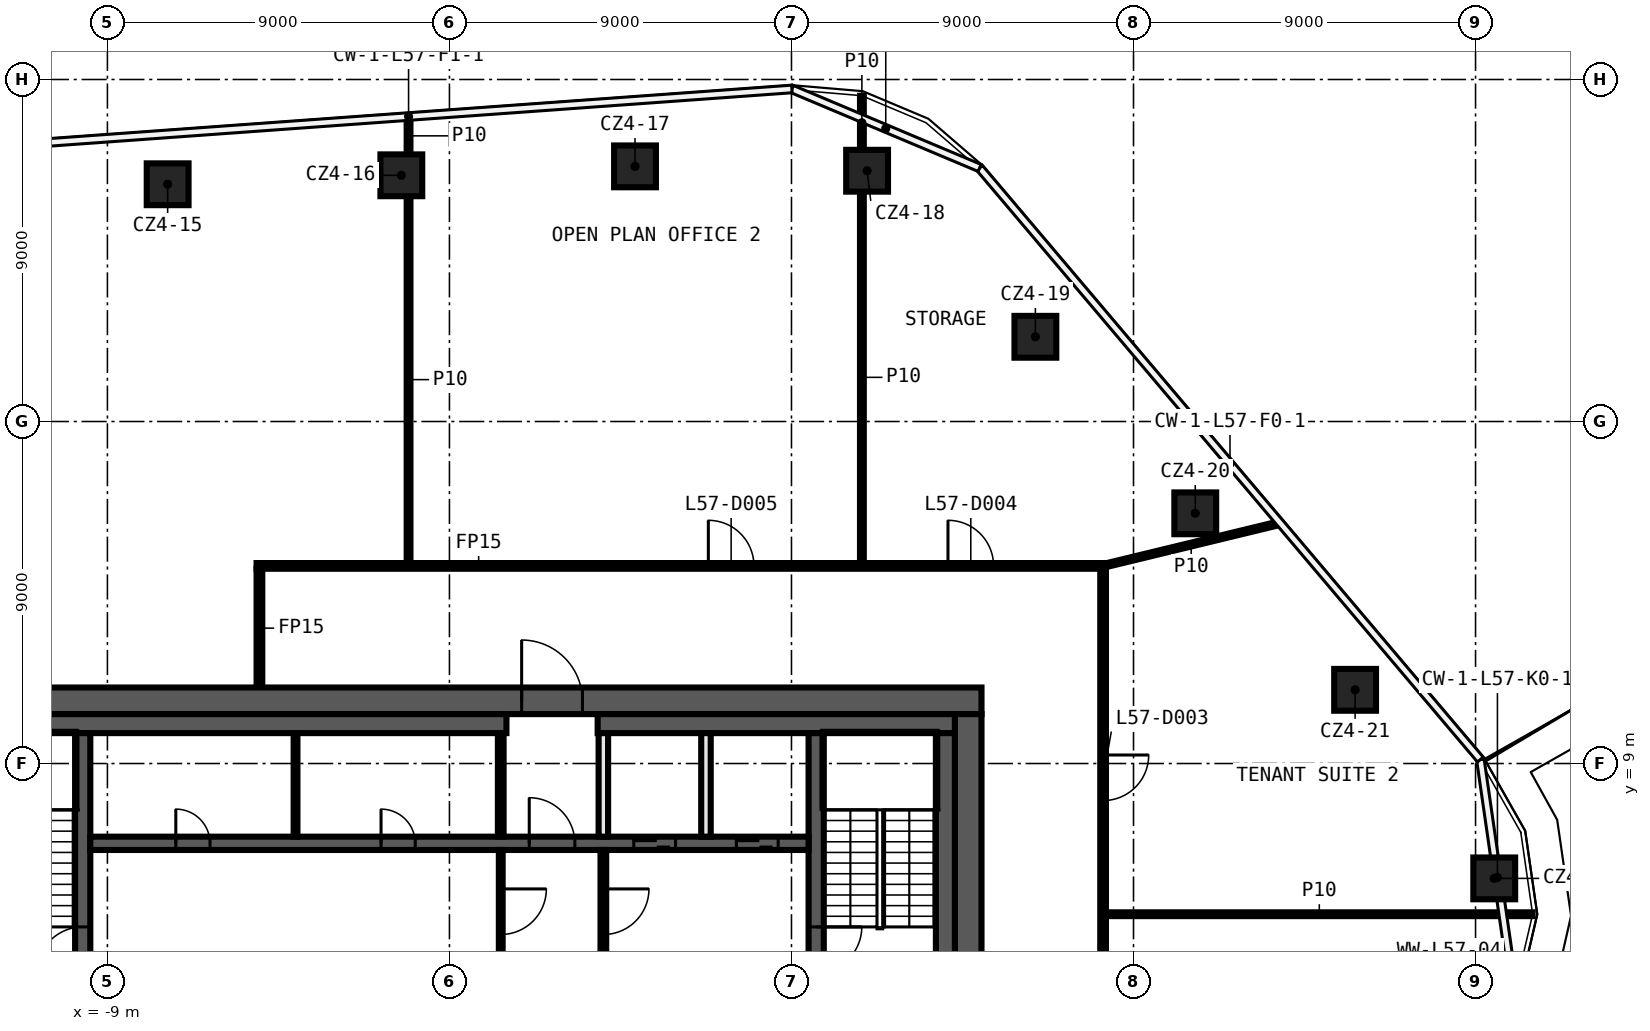
"""IFC4 building model, lengths in metres.
Left out: names, types, materials, properties, quantities, classifications, styles, units other than length and angle.
Written with IfcOpenShell. Run it as: python <this file> out.ifc"""

import sys

from ifc_helpers import new_model, si_unit, direction, frame, frame_2d, origin, origin_2d, place, context, subcontext, project, spatial, rectangle, extrude, element, fill, save


model = new_model("IFC4")
c1 = context("Model", 3, precision=1e-05, world=origin(), true_north=direction((0.0, 1.0)))
c2 = subcontext(c1, "Body", "Model", "MODEL_VIEW")
j1 = project(units=[si_unit("LENGTHUNIT", "METRE"), si_unit("PLANEANGLEUNIT", "RADIAN")], contexts=[c1])
p1 = place(None, origin())
s1 = spatial("IfcSite", under=j1, at=p1, CompositionType="ELEMENT")
p2 = place(p1, origin())
s2 = spatial("IfcBuilding", under=s1, at=p2, CompositionType="ELEMENT")
p3 = place(p2, frame((0.0, 0.0, 270.6)))
s3 = spatial("IfcBuildingStorey", under=s2, at=p3, CompositionType="ELEMENT", Elevation=270.6)
for number, where, z_axis, x_axis in (
    (1, (-7.415, 24.243, 0.0), (0.0, 0.0, 1.0), (1.0, 0.0, 0.0)),
    (2, (-1.266, 24.479, 0.0), (0.0, 0.0, 1.0), (1.0, 0.0, 0.0)),
    (3, (4.883, 24.714, 0.0), (0.0, 0.0, 1.0), (1.0, 0.0, 0.0)),
    (4, (10.99, 24.599, 0.0), (0.0, 0.0, 1.0), (1.0, 0.0, 0.0)),
    (5, (15.418, 20.229, 0.0), (0.0, 0.0, 1.0), (1.0, 0.0, 0.0)),
    (6, (19.625, 15.584, 0.0), (0.0, 0.0, 1.0), (1.0, 0.0, 0.0)),
    (7, (23.831, 10.939, 0.0), (0.0, 0.0, 1.0), (1.0, 0.0, 0.0)),
    (8, (27.492, 5.977, 0.0), (0.0, 0.0, 1.0), (1.0, 0.0, 0.0)),
):
    element("IfcColumn", number, at=place(p3, frame(where, z_axis=z_axis, x_axis=x_axis)), inside=s3, PredefinedType="COLUMN", context=c2, shape_type="SweptSolid", body=[
        extrude(rectangle(XDim=1.1, YDim=1.1, at=origin_2d()), origin(), (0.0, 0.0, 1.0), 3.82),
    ])
p4 = place(p3, frame((17.275, 5.034, 0.0), z_axis=(0.0, 0.0, 1.0), x_axis=(1.0, 0.0, 0.0)))
e9 = element("IfcWall", 9, at=p4, inside=s3, PredefinedType="PARTITIONING", context=c2, shape_type="SweptSolid", body=[
    extrude(rectangle(XDim=11.227, YDim=0.1, at=frame_2d((5.614, 0.0))), origin(), (0.0, 0.0, 1.0), 3.82),
])
p5 = place(p3, frame((-5.075, 14.2, 0.0), z_axis=(0.0, 0.0, 1.0), x_axis=(1.0, 0.0, 0.0)))
e10 = element("IfcWall", 10, at=p5, inside=s3, PredefinedType="PARTITIONING", context=c2, shape_type="SweptSolid", body=[
    extrude(rectangle(XDim=22.35, YDim=0.15, at=frame_2d((11.175, 0.0))), origin(), (0.0, 0.0, 1.0), 3.82),
])
p6 = place(p5, frame((18.193, 0.0, 0.0)))
e11 = element("IfcOpeningElement", 11, at=p6, cuts=e10, PredefinedType="OPENING", context=c2, shape_type="SweptSolid", body=[
    extrude(rectangle(XDim=1.2, YDim=2.1, at=frame_2d((0.6, 1.05))), frame((0.0, 0.085, 0.0), z_axis=(0.0, -1.0, 0.0), x_axis=(1.0, 0.0, 0.0)), (0.0, 0.0, 1.0), 0.17),
])
p7 = place(p5, frame((11.887, 0.0, 0.0)))
e12 = element("IfcOpeningElement", 12, at=p7, cuts=e10, PredefinedType="OPENING", context=c2, shape_type="SweptSolid", body=[
    extrude(rectangle(XDim=1.2, YDim=2.1, at=frame_2d((0.6, 1.05))), frame((0.0, 0.085, 0.0), z_axis=(0.0, -1.0, 0.0), x_axis=(1.0, 0.0, 0.0)), (0.0, 0.0, 1.0), 0.17),
])
p8 = place(p3, frame((17.2, 14.2, 0.0), z_axis=(0.0, 0.0, 1.0), x_axis=(0.971845844502, 0.235617602322, 0.0)))
e13 = element("IfcWall", 13, at=p8, inside=s3, PredefinedType="PARTITIONING", context=c2, shape_type="SweptSolid", body=[
    extrude(rectangle(XDim=4.771, YDim=0.1, at=frame_2d((2.385, 0.0))), origin(), (0.0, 0.0, 1.0), 3.82),
])
p9 = place(p3, frame((17.2, 14.125, 0.0), z_axis=(0.0, 0.0, 1.0), x_axis=(0.0, -1.0, 0.0)))
e14 = element("IfcWall", 14, at=p9, inside=s3, PredefinedType="PARTITIONING", context=c2, shape_type="SweptSolid", body=[
    extrude(rectangle(XDim=28.25, YDim=0.15, at=frame_2d((14.125, 0.0))), origin(), (0.0, 0.0, 1.0), 3.82),
])
p10 = place(p9, frame((23.379, 0.0, 0.0)))
e15 = element("IfcOpeningElement", 15, at=p10, cuts=e14, PredefinedType="OPENING", context=c2, shape_type="SweptSolid", body=[
    extrude(rectangle(XDim=1.2, YDim=2.1, at=frame_2d((0.6, 1.05))), frame((0.0, 0.085, 0.0), z_axis=(0.0, -1.0, 0.0), x_axis=(1.0, 0.0, 0.0)), (0.0, 0.0, 1.0), 0.17),
])
p11 = place(p9, frame((4.901, 0.0, 0.0)))
e16 = element("IfcOpeningElement", 16, at=p11, cuts=e14, PredefinedType="OPENING", context=c2, shape_type="SweptSolid", body=[
    extrude(rectangle(XDim=1.2, YDim=2.1, at=frame_2d((0.6, 1.05))), frame((0.0, 0.085, 0.0), z_axis=(0.0, -1.0, 0.0), x_axis=(1.0, 0.0, 0.0)), (0.0, 0.0, 1.0), 0.17),
])
p12 = place(p3, frame((10.853, 14.275, 0.0), z_axis=(0.0, 0.0, 1.0), x_axis=(0.0, 1.0, 0.0)))
e17 = element("IfcWall", 17, at=p12, inside=s3, PredefinedType="PARTITIONING", context=c2, shape_type="SweptSolid", body=[
    extrude(rectangle(XDim=9.774, YDim=0.1, at=frame_2d((4.887, 0.0))), origin(), (0.0, 0.0, 1.0), 3.82),
])
p13 = place(p3, frame((10.853, 25.149, 0.0), z_axis=(0.0, 0.0, 1.0), x_axis=(0.0, 1.0, 0.0)))
e18 = element("IfcWall", 18, at=p13, inside=s3, PredefinedType="PARTITIONING", context=c2, shape_type="SweptSolid", body=[
    extrude(rectangle(XDim=1.423, YDim=0.1, at=frame_2d((0.712, 0.0))), origin(), (0.0, 0.0, 1.0), 3.82),
])
p14 = place(p3, frame((-1.076, 14.275, 0.0), z_axis=(0.0, 0.0, 1.0), x_axis=(0.0, 1.0, 0.0)))
e19 = element("IfcWall", 19, at=p14, inside=s3, PredefinedType="PARTITIONING", context=c2, shape_type="SweptSolid", body=[
    extrude(rectangle(XDim=9.654, YDim=0.1, at=frame_2d((4.827, 0.0))), origin(), (0.0, 0.0, 1.0), 3.82),
])
p15 = place(p3, frame((-1.076, 25.029, 0.0), z_axis=(0.0, 0.0, 1.0), x_axis=(0.0, 1.0, 0.0)))
e20 = element("IfcWall", 20, at=p15, inside=s3, PredefinedType="PARTITIONING", context=c2, shape_type="SweptSolid", body=[
    extrude(rectangle(XDim=0.976, YDim=0.1, at=frame_2d((0.488, 0.0))), origin(), (0.0, 0.0, 1.0), 3.82),
])
p16 = place(p3, frame((-5.0, 11.0, 0.0), z_axis=(0.0, 0.0, 1.0), x_axis=(0.0, 1.0, 0.0)))
e21 = element("IfcWall", 21, at=p16, inside=s3, PredefinedType="PARTITIONING", context=c2, shape_type="SweptSolid", body=[
    extrude(rectangle(XDim=3.125, YDim=0.15, at=frame_2d((1.562, 0.0))), origin(), (0.0, 0.0, 1.0), 3.82),
])
p17 = place(p3, frame((-14.0, 10.65, 0.0), z_axis=(0.0, 0.0, 1.0), x_axis=(1.0, 0.0, 0.0)))
e22 = element("IfcWall", 22, at=p17, inside=s3, PredefinedType="SHEAR", context=c2, shape_type="SweptSolid", body=[
    extrude(rectangle(XDim=28.0, YDim=0.7, at=frame_2d((14.0, 0.0))), origin(), (0.0, 0.0, 1.0), 3.82),
])
p18 = place(p17, frame((15.9, 0.0, 0.0)))
e23 = element("IfcOpeningElement", 23, at=p18, cuts=e22, PredefinedType="OPENING", context=c2, shape_type="SweptSolid", body=[
    extrude(rectangle(XDim=1.6, YDim=2.1, at=frame_2d((0.8, 1.05))), frame((0.0, 0.36, 0.0), z_axis=(0.0, -1.0, 0.0), x_axis=(1.0, 0.0, 0.0)), (0.0, 0.0, 1.0), 0.72),
])
p19 = place(p3, frame((13.65, 10.3, 0.0), z_axis=(0.0, 0.0, 1.0), x_axis=(0.0, -1.0, 0.0)))
e24 = element("IfcWall", 24, at=p19, inside=s3, PredefinedType="SHEAR", context=c2, shape_type="SweptSolid", body=[
    extrude(rectangle(XDim=20.6, YDim=0.7, at=frame_2d((10.3, 0.0))), origin(), (0.0, 0.0, 1.0), 3.82),
])
p20 = place(p3, frame((-13.3, 10.05, 0.0), z_axis=(0.0, 0.0, 1.0), x_axis=(1.0, 0.0, 0.0)))
e25 = element("IfcWall", 25, at=p20, inside=s3, PredefinedType="SHEAR", context=c2, shape_type="SweptSolid", body=[
    extrude(rectangle(XDim=14.8, YDim=0.5, at=frame_2d((7.4, 0.0))), origin(), (0.0, 0.0, 1.0), 3.82),
])
p21 = place(p3, frame((3.9, 10.05, 0.0), z_axis=(0.0, 0.0, 1.0), x_axis=(1.0, 0.0, 0.0)))
e26 = element("IfcWall", 26, at=p21, inside=s3, PredefinedType="SHEAR", context=c2, shape_type="SweptSolid", body=[
    extrude(rectangle(XDim=9.4, YDim=0.5, at=frame_2d((4.7, 0.0))), origin(), (0.0, 0.0, 1.0), 3.82),
])
p22 = place(p3, frame((13.05, 9.8, 0.0), z_axis=(0.0, 0.0, 1.0), x_axis=(0.0, -1.0, 0.0)))
e27 = element("IfcWall", 27, at=p22, inside=s3, PredefinedType="SHEAR", context=c2, shape_type="SweptSolid", body=[
    extrude(rectangle(XDim=19.6, YDim=0.5, at=frame_2d((9.8, 0.0))), origin(), (0.0, 0.0, 1.0), 3.82),
])
p23 = place(p3, frame((9.65, 9.8, 0.0), z_axis=(0.0, 0.0, 1.0), x_axis=(0.0, -1.0, 0.0)))
e28 = element("IfcWall", 28, at=p23, inside=s3, PredefinedType="SHEAR", context=c2, shape_type="SweptSolid", body=[
    extrude(rectangle(XDim=7.5, YDim=0.4, at=frame_2d((3.75, 0.0))), origin(), (0.0, 0.0, 1.0), 3.82),
])
p24 = place(p23, frame((5.1, 0.0, 0.0)))
e29 = element("IfcOpeningElement", 29, at=p24, cuts=e28, PredefinedType="OPENING", context=c2, shape_type="SweptSolid", body=[
    extrude(rectangle(XDim=1.2, YDim=2.1, at=frame_2d((0.6, 1.05))), frame((0.0, 0.21, 0.0), z_axis=(0.0, -1.0, 0.0), x_axis=(1.0, 0.0, 0.0)), (0.0, 0.0, 1.0), 0.42),
])
p25 = place(p3, frame((-9.65, 2.3, 0.0), z_axis=(0.0, 0.0, 1.0), x_axis=(0.0, 1.0, 0.0)))
e30 = element("IfcWall", 30, at=p25, inside=s3, PredefinedType="SHEAR", context=c2, shape_type="SweptSolid", body=[
    extrude(rectangle(XDim=7.5, YDim=0.4, at=frame_2d((3.75, 0.0))), origin(), (0.0, 0.0, 1.0), 3.82),
])
p26 = place(p25, frame((1.2, 0.0, 0.0)))
e31 = element("IfcOpeningElement", 31, at=p26, cuts=e30, PredefinedType="OPENING", context=c2, shape_type="SweptSolid", body=[
    extrude(rectangle(XDim=1.2, YDim=2.1, at=frame_2d((0.6, 1.05))), frame((0.0, 0.21, 0.0), z_axis=(0.0, -1.0, 0.0), x_axis=(1.0, 0.0, 0.0)), (0.0, 0.0, 1.0), 0.42),
])
p27 = place(p3, frame((-9.45, 6.9, 0.0), z_axis=(0.0, 0.0, 1.0), x_axis=(1.0, 0.0, 0.0)))
e32 = element("IfcWall", 32, at=p27, inside=s3, PredefinedType="SHEAR", context=c2, shape_type="SweptSolid", body=[
    extrude(rectangle(XDim=18.9, YDim=0.35, at=frame_2d((9.45, 0.0))), origin(), (0.0, 0.0, 1.0), 3.82),
])
p28 = place(p27, frame((11.55, 0.0, 0.0)))
e33 = element("IfcOpeningElement", 33, at=p28, cuts=e32, PredefinedType="OPENING", context=c2, shape_type="SweptSolid", body=[
    extrude(rectangle(XDim=1.2, YDim=2.1, at=frame_2d((0.6, 1.05))), frame((0.0, 0.185, 0.0), z_axis=(0.0, -1.0, 0.0), x_axis=(1.0, 0.0, 0.0)), (0.0, 0.0, 1.0), 0.37),
])
p29 = place(p27, frame((14.3, 0.0, 0.0)))
e34 = element("IfcOpeningElement", 34, at=p29, cuts=e32, PredefinedType="OPENING", context=c2, shape_type="SweptSolid", body=[
    extrude(rectangle(XDim=1.1, YDim=2.1, at=frame_2d((0.55, 1.05))), frame((0.0, 0.185, 0.0), z_axis=(0.0, -1.0, 0.0), x_axis=(1.0, 0.0, 0.0)), (0.0, 0.0, 1.0), 0.37),
])
p30 = place(p27, frame((17.0, 0.0, 0.0)))
e35 = element("IfcOpeningElement", 35, at=p30, cuts=e32, PredefinedType="OPENING", context=c2, shape_type="SweptSolid", body=[
    extrude(rectangle(XDim=1.1, YDim=2.1, at=frame_2d((0.55, 1.05))), frame((0.0, 0.185, 0.0), z_axis=(0.0, -1.0, 0.0), x_axis=(1.0, 0.0, 0.0)), (0.0, 0.0, 1.0), 0.37),
])
p31 = place(p27, frame((2.25, 0.0, 0.0)))
e36 = element("IfcOpeningElement", 36, at=p31, cuts=e32, PredefinedType="OPENING", context=c2, shape_type="SweptSolid", body=[
    extrude(rectangle(XDim=0.9, YDim=2.1, at=frame_2d((0.45, 1.05))), frame((0.0, 0.185, 0.0), z_axis=(0.0, -1.0, 0.0), x_axis=(1.0, 0.0, 0.0)), (0.0, 0.0, 1.0), 0.37),
])
p32 = place(p27, frame((7.65, 0.0, 0.0)))
e37 = element("IfcOpeningElement", 37, at=p32, cuts=e32, PredefinedType="OPENING", context=c2, shape_type="SweptSolid", body=[
    extrude(rectangle(XDim=0.9, YDim=2.1, at=frame_2d((0.45, 1.05))), frame((0.0, 0.185, 0.0), z_axis=(0.0, -1.0, 0.0), x_axis=(1.0, 0.0, 0.0)), (0.0, 0.0, 1.0), 0.37),
])
p33 = place(p3, frame((6.75, 7.075, 0.0), z_axis=(0.0, 0.0, 1.0), x_axis=(0.0, 1.0, 0.0)))
e38 = element("IfcWall", 38, at=p33, inside=s3, PredefinedType="SOLIDWALL", context=c2, shape_type="SweptSolid", body=[
    extrude(rectangle(XDim=2.725, YDim=0.25, at=frame_2d((1.363, 0.0))), origin(), (0.0, 0.0, 1.0), 3.82),
])
p34 = place(p3, frame((4.05, 6.725, 0.0), z_axis=(0.0, 0.0, 1.0), x_axis=(0.0, -1.0, 0.0)))
e39 = element("IfcWall", 39, at=p34, inside=s3, PredefinedType="PARTITIONING", context=c2, shape_type="SweptSolid", body=[
    extrude(rectangle(XDim=3.25, YDim=0.15, at=frame_2d((1.625, 0.0))), origin(), (0.0, 0.0, 1.0), 3.82),
])
p35 = place(p34, frame((1.025, 0.0, 0.0)))
e40 = element("IfcOpeningElement", 40, at=p35, cuts=e39, PredefinedType="OPENING", context=c2, shape_type="SweptSolid", body=[
    extrude(rectangle(XDim=1.2, YDim=2.1, at=frame_2d((0.6, 1.05))), frame((0.0, 0.085, 0.0), z_axis=(0.0, -1.0, 0.0), x_axis=(1.0, 0.0, 0.0)), (0.0, 0.0, 1.0), 0.17),
])
p36 = place(p3, frame((4.05, 7.075, 0.0), z_axis=(0.0, 0.0, 1.0), x_axis=(0.0, 1.0, 0.0)))
e41 = element("IfcWall", 41, at=p36, inside=s3, PredefinedType="SOLIDWALL", context=c2, shape_type="SweptSolid", body=[
    extrude(rectangle(XDim=2.725, YDim=0.25, at=frame_2d((1.363, 0.0))), origin(), (0.0, 0.0, 1.0), 3.82),
])
p37 = place(p3, frame((1.35, 7.075, 0.0), z_axis=(0.0, 0.0, 1.0), x_axis=(0.0, 1.0, 0.0)))
e42 = element("IfcWall", 42, at=p37, inside=s3, PredefinedType="PARTITIONING", context=c2, shape_type="SweptSolid", body=[
    extrude(rectangle(XDim=2.725, YDim=0.15, at=frame_2d((1.363, 0.0))), origin(), (0.0, 0.0, 1.0), 3.82),
])
p38 = place(p3, frame((1.35, 6.725, 0.0), z_axis=(0.0, 0.0, 1.0), x_axis=(0.0, -1.0, 0.0)))
e43 = element("IfcWall", 43, at=p38, inside=s3, PredefinedType="PARTITIONING", context=c2, shape_type="SweptSolid", body=[
    extrude(rectangle(XDim=3.25, YDim=0.1, at=frame_2d((1.625, 0.0))), origin(), (0.0, 0.0, 1.0), 3.82),
])
p39 = place(p38, frame((1.025, 0.0, 0.0)))
e44 = element("IfcOpeningElement", 44, at=p39, cuts=e43, PredefinedType="OPENING", context=c2, shape_type="SweptSolid", body=[
    extrude(rectangle(XDim=1.2, YDim=2.1, at=frame_2d((0.6, 1.05))), frame((0.0, 0.06, 0.0), z_axis=(0.0, -1.0, 0.0), x_axis=(1.0, 0.0, 0.0)), (0.0, 0.0, 1.0), 0.12),
])
p40 = place(p3, frame((-4.05, 7.075, 0.0), z_axis=(0.0, 0.0, 1.0), x_axis=(0.0, 1.0, 0.0)))
e45 = element("IfcWall", 45, at=p40, inside=s3, PredefinedType="PARTITIONING", context=c2, shape_type="SweptSolid", body=[
    extrude(rectangle(XDim=2.725, YDim=0.1, at=frame_2d((1.363, 0.0))), origin(), (0.0, 0.0, 1.0), 3.82),
])
p41 = place(p11, origin())
e46 = element("IfcDoor", 46, at=p41, inside=s3, OperationType="SINGLE_SWING_RIGHT", PredefinedType="DOOR", context=c2, shape_type="SweptSolid", body=[
    extrude(rectangle(XDim=1.2, YDim=2.1, at=frame_2d((0.6, 1.05))), frame((0.0, 0.025, 0.0), z_axis=(0.0, -1.0, 0.0), x_axis=(1.0, 0.0, 0.0)), (0.0, 0.0, 1.0), 0.05),
])
fill(e16, e46)
p42 = place(p6, origin())
e47 = element("IfcDoor", 47, at=p42, inside=s3, OperationType="SINGLE_SWING_LEFT", PredefinedType="DOOR", context=c2, shape_type="SweptSolid", body=[
    extrude(rectangle(XDim=1.2, YDim=2.1, at=frame_2d((0.6, 1.05))), frame((0.0, 0.025, 0.0), z_axis=(0.0, -1.0, 0.0), x_axis=(1.0, 0.0, 0.0)), (0.0, 0.0, 1.0), 0.05),
])
fill(e11, e47)
p43 = place(p7, origin())
e48 = element("IfcDoor", 48, at=p43, inside=s3, OperationType="SINGLE_SWING_RIGHT", PredefinedType="DOOR", context=c2, shape_type="SweptSolid", body=[
    extrude(rectangle(XDim=1.2, YDim=2.1, at=frame_2d((0.6, 1.05))), frame((0.0, 0.025, 0.0), z_axis=(0.0, -1.0, 0.0), x_axis=(1.0, 0.0, 0.0)), (0.0, 0.0, 1.0), 0.05),
])
fill(e12, e48)
p44 = place(p18, origin())
e49 = element("IfcDoor", 49, at=p44, inside=s3, OperationType="DOUBLE_DOOR_SINGLE_SWING", PredefinedType="DOOR", context=c2, shape_type="SweptSolid", body=[
    extrude(rectangle(XDim=1.6, YDim=2.1, at=frame_2d((0.8, 1.05))), frame((0.0, 0.025, 0.0), z_axis=(0.0, -1.0, 0.0), x_axis=(1.0, 0.0, 0.0)), (0.0, 0.0, 1.0), 0.05),
])
fill(e23, e49)
p45 = place(p28, origin())
e50 = element("IfcDoor", 50, at=p45, inside=s3, OperationType="SINGLE_SWING_LEFT", PredefinedType="DOOR", context=c2, shape_type="SweptSolid", body=[
    extrude(rectangle(XDim=1.2, YDim=2.1, at=frame_2d((0.6, 1.05))), frame((0.0, 0.025, 0.0), z_axis=(0.0, -1.0, 0.0), x_axis=(1.0, 0.0, 0.0)), (0.0, 0.0, 1.0), 0.05),
])
fill(e33, e50)
p46 = place(p29, origin())
e51 = element("IfcDoor", 51, at=p46, inside=s3, OperationType="DOUBLE_DOOR_SLIDING", PredefinedType="DOOR", context=c2, shape_type="SweptSolid", body=[
    extrude(rectangle(XDim=1.1, YDim=2.1, at=frame_2d((0.55, 1.05))), frame((0.0, 0.025, 0.0), z_axis=(0.0, -1.0, 0.0), x_axis=(1.0, 0.0, 0.0)), (0.0, 0.0, 1.0), 0.05),
])
fill(e34, e51)
p47 = place(p30, origin())
e52 = element("IfcDoor", 52, at=p47, inside=s3, OperationType="DOUBLE_DOOR_SLIDING", PredefinedType="DOOR", context=c2, shape_type="SweptSolid", body=[
    extrude(rectangle(XDim=1.1, YDim=2.1, at=frame_2d((0.55, 1.05))), frame((0.0, 0.025, 0.0), z_axis=(0.0, -1.0, 0.0), x_axis=(1.0, 0.0, 0.0)), (0.0, 0.0, 1.0), 0.05),
])
fill(e35, e52)
p48 = place(p31, origin())
e53 = element("IfcDoor", 53, at=p48, inside=s3, OperationType="SINGLE_SWING_RIGHT", PredefinedType="DOOR", context=c2, shape_type="SweptSolid", body=[
    extrude(rectangle(XDim=0.9, YDim=2.1, at=frame_2d((0.45, 1.05))), frame((0.0, 0.025, 0.0), z_axis=(0.0, -1.0, 0.0), x_axis=(1.0, 0.0, 0.0)), (0.0, 0.0, 1.0), 0.05),
])
fill(e36, e53)
p49 = place(p32, origin())
e54 = element("IfcDoor", 54, at=p49, inside=s3, OperationType="SINGLE_SWING_LEFT", PredefinedType="DOOR", context=c2, shape_type="SweptSolid", body=[
    extrude(rectangle(XDim=0.9, YDim=2.1, at=frame_2d((0.45, 1.05))), frame((0.0, 0.025, 0.0), z_axis=(0.0, -1.0, 0.0), x_axis=(1.0, 0.0, 0.0)), (0.0, 0.0, 1.0), 0.05),
])
fill(e37, e54)
p50 = place(p24, origin())
e55 = element("IfcDoor", 55, at=p50, inside=s3, OperationType="SINGLE_SWING_LEFT", PredefinedType="DOOR", context=c2, shape_type="SweptSolid", body=[
    extrude(rectangle(XDim=1.2, YDim=2.1, at=frame_2d((0.6, 1.05))), frame((0.0, 0.025, 0.0), z_axis=(0.0, -1.0, 0.0), x_axis=(1.0, 0.0, 0.0)), (0.0, 0.0, 1.0), 0.05),
])
fill(e29, e55)
p51 = place(p26, origin())
e56 = element("IfcDoor", 56, at=p51, inside=s3, OperationType="SINGLE_SWING_RIGHT", PredefinedType="DOOR", context=c2, shape_type="SweptSolid", body=[
    extrude(rectangle(XDim=1.2, YDim=2.1, at=frame_2d((0.6, 1.05))), frame((0.0, 0.025, 0.0), z_axis=(0.0, -1.0, 0.0), x_axis=(1.0, 0.0, 0.0)), (0.0, 0.0, 1.0), 0.05),
])
fill(e31, e56)
p52 = place(p39, origin())
e57 = element("IfcDoor", 57, at=p52, inside=s3, OperationType="SINGLE_SWING_LEFT", PredefinedType="DOOR", context=c2, shape_type="SweptSolid", body=[
    extrude(rectangle(XDim=1.2, YDim=2.1, at=frame_2d((0.6, 1.05))), frame((0.0, 0.025, 0.0), z_axis=(0.0, -1.0, 0.0), x_axis=(1.0, 0.0, 0.0)), (0.0, 0.0, 1.0), 0.05),
])
fill(e44, e57)
p53 = place(p35, origin())
e58 = element("IfcDoor", 58, at=p53, inside=s3, OperationType="SINGLE_SWING_RIGHT", PredefinedType="DOOR", context=c2, shape_type="SweptSolid", body=[
    extrude(rectangle(XDim=1.2, YDim=2.1, at=frame_2d((0.6, 1.05))), frame((0.0, 0.025, 0.0), z_axis=(0.0, -1.0, 0.0), x_axis=(1.0, 0.0, 0.0)), (0.0, 0.0, 1.0), 0.05),
])
fill(e40, e58)
save(model, sys.argv[1])
